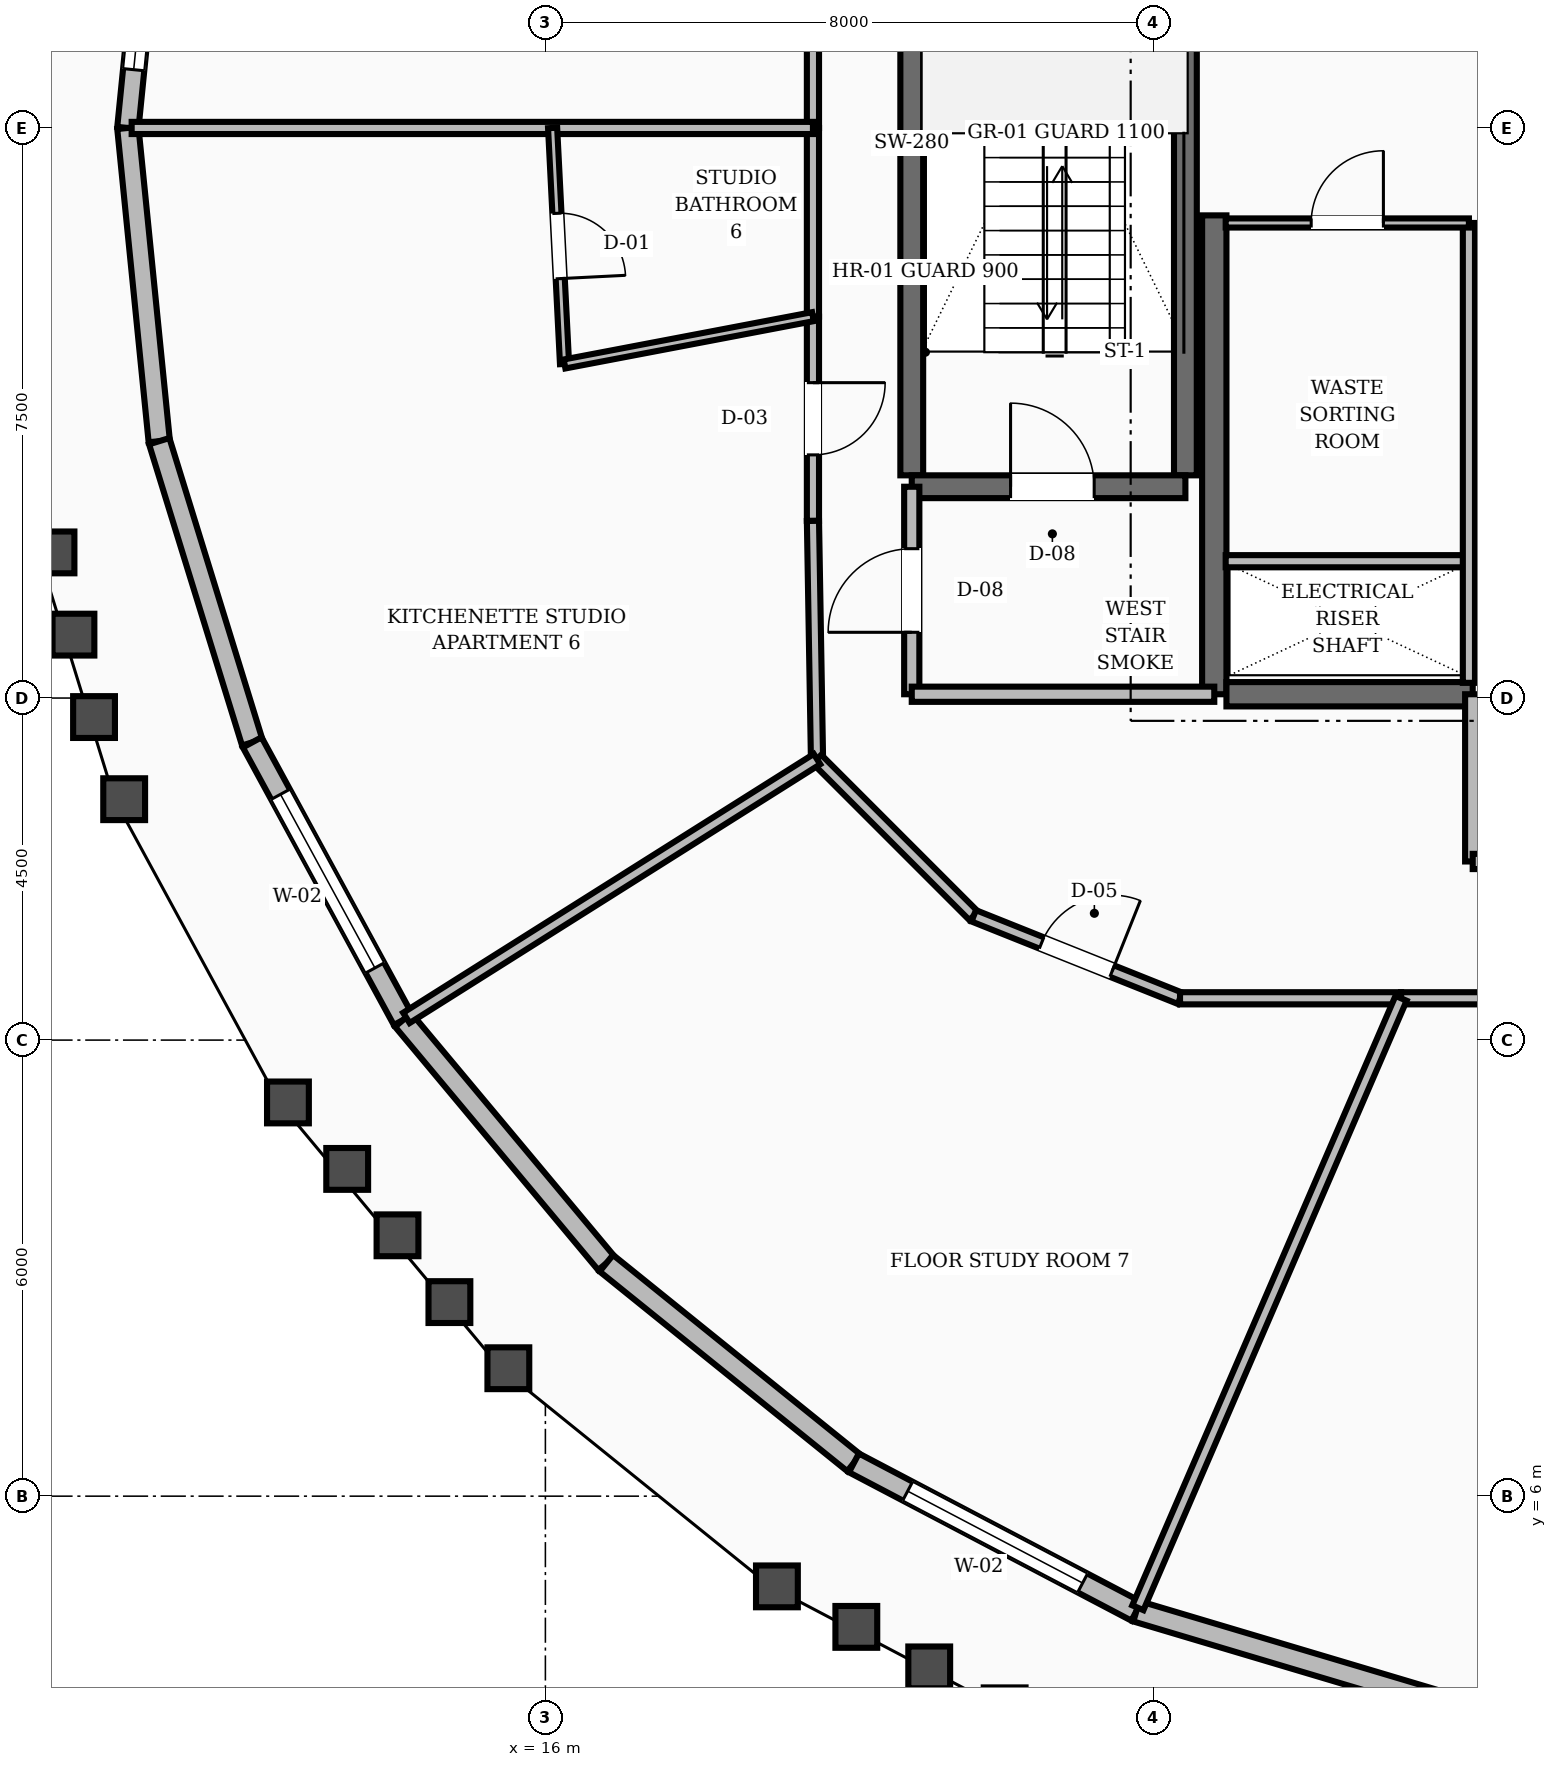
"""IFC4 building model, lengths in metres.
Left out: names, types, materials, properties, quantities, classifications, styles, units other than length and angle.
Written with IfcOpenShell. Run it as: python <this file> out.ifc"""

import sys

from ifc_helpers import new_model, si_unit, direction, frame, frame_2d, origin, place, context, subcontext, project, spatial, rectangle, extrude, element, fill, save


model = new_model("IFC4")
c1 = context("Model", 3, precision=1e-05, world=origin(), true_north=direction((0.0, 1.0)))
c2 = subcontext(c1, "Body", "Model", "MODEL_VIEW")
j1 = project(units=[si_unit("LENGTHUNIT", "METRE"), si_unit("PLANEANGLEUNIT", "RADIAN")], contexts=[c1])
p1 = place(None, origin())
s1 = spatial("IfcSite", under=j1, at=p1, CompositionType="ELEMENT")
p2 = place(p1, origin())
s2 = spatial("IfcBuilding", under=s1, at=p2, CompositionType="ELEMENT")
p3 = place(p2, frame((0.0, 0.0, 243.6)))
s3 = spatial("IfcBuildingStorey", under=s2, at=p3, CompositionType="ELEMENT", Elevation=243.6)
p4 = place(p3, frame((24.8, 16.55, 0.0), z_axis=(0.0, 0.0, 1.0), x_axis=(0.0, 1.0, 0.0)))
e1 = element("IfcWall", 1, at=p4, inside=s3, PredefinedType="SHEAR", context=c2, shape_type="SweptSolid", body=[
    extrude(rectangle(XDim=6.3, YDim=0.32, at=frame_2d((3.15, 0.0))), origin(), (0.0, 0.0, 1.0), 3.6),
])
p5 = place(p3, frame((24.96, 16.55, 0.0), z_axis=(0.0, 0.0, 1.0), x_axis=(1.0, 0.0, 0.0)))
e2 = element("IfcWall", 2, at=p5, inside=s3, PredefinedType="SHEAR", context=c2, shape_type="SweptSolid", body=[
    extrude(rectangle(XDim=3.24, YDim=0.32, at=frame_2d((1.62, 0.0))), origin(), (0.0, 0.0, 1.0), 3.6),
])
for number, where, z_axis, x_axis in (
    (3, (20.82, 19.43, 0.0), (0.0, 0.0, 1.0), (0.0, 1.0, 0.0)),
    (4, (24.42, 19.43, 0.0), (0.0, 0.0, 1.0), (0.0, 1.0, 0.0)),
):
    element("IfcWall", number, at=place(p3, frame(where, z_axis=z_axis, x_axis=x_axis)), inside=s3, PredefinedType="SHEAR", context=c2, shape_type="SweptSolid", body=[
        extrude(rectangle(XDim=8.74, YDim=0.3, at=frame_2d((4.37, 0.0))), origin(), (0.0, 0.0, 1.0), 3.6),
    ])
p6 = place(p3, frame((20.82, 19.28, 0.0), z_axis=(0.0, 0.0, 1.0), x_axis=(1.0, 0.0, 0.0)))
e5 = element("IfcWall", 5, at=p6, inside=s3, PredefinedType="SHEAR", context=c2, shape_type="SweptSolid", body=[
    extrude(rectangle(XDim=3.6, YDim=0.3, at=frame_2d((1.8, 0.0))), origin(), (0.0, 0.0, 1.0), 3.6),
])
p7 = place(p6, frame((1.3, 0.0, 0.0)))
e6 = element("IfcOpeningElement", 6, at=p7, cuts=e5, PredefinedType="OPENING", context=c2, shape_type="SweptSolid", body=[
    extrude(rectangle(XDim=1.1, YDim=2.1, at=frame_2d((0.55, 1.05))), frame((0.0, 0.16, 0.0), z_axis=(0.0, -1.0, 0.0), x_axis=(1.0, 0.0, 0.0)), (0.0, 0.0, 1.0), 0.32),
])
p8 = place(p3, frame((10.92, 28.121, 0.0), z_axis=(0.0, 0.0, 1.0), x_axis=(-0.099748868054, -0.995012644805, 0.0)))
e7 = element("IfcWall", 7, at=p8, inside=s3, PredefinedType="STANDARD", context=c2, shape_type="SweptSolid", body=[
    extrude(rectangle(XDim=4.141, YDim=0.28, at=frame_2d((2.071, 0.0))), origin(), (0.0, 0.0, 1.0), 2.88),
])
p9 = place(p8, frame((0.771, 0.0, 0.8)))
e8 = element("IfcOpeningElement", 8, at=p9, cuts=e7, PredefinedType="OPENING", context=c2, shape_type="SweptSolid", body=[
    extrude(rectangle(XDim=2.6, YDim=1.65, at=frame_2d((1.3, 0.825))), frame((0.0, 0.15, 0.0), z_axis=(0.0, -1.0, 0.0), x_axis=(1.0, 0.0, 0.0)), (0.0, 0.0, 1.0), 0.3),
])
p10 = place(p3, frame((10.507, 24.0, 0.0), z_axis=(0.0, 0.0, 1.0), x_axis=(0.099748868054, -0.995012644805, 0.0)))
e9 = element("IfcWall", 9, at=p10, inside=s3, PredefinedType="STANDARD", context=c2, shape_type="SweptSolid", body=[
    extrude(rectangle(XDim=4.141, YDim=0.28, at=frame_2d((2.071, 0.0))), origin(), (0.0, 0.0, 1.0), 2.88),
])
p11 = place(p3, frame((10.92, 19.879, 0.0), z_axis=(0.0, 0.0, 1.0), x_axis=(0.294900751468, -0.955527889066, 0.0)))
e10 = element("IfcWall", 10, at=p11, inside=s3, PredefinedType="STANDARD", context=c2, shape_type="SweptSolid", body=[
    extrude(rectangle(XDim=4.147, YDim=0.28, at=frame_2d((2.073, 0.0))), origin(), (0.0, 0.0, 1.0), 2.88),
])
p12 = place(p3, frame((12.143, 15.917, 0.0), z_axis=(0.0, 0.0, 1.0), x_axis=(0.477839535555, -0.878447140277, 0.0)))
e11 = element("IfcWall", 11, at=p12, inside=s3, PredefinedType="STANDARD", context=c2, shape_type="SweptSolid", body=[
    extrude(rectangle(XDim=4.157, YDim=0.28, at=frame_2d((2.079, 0.0))), origin(), (0.0, 0.0, 1.0), 2.88),
])
p13 = place(p12, frame((0.778, 0.0, 0.8)))
e12 = element("IfcOpeningElement", 12, at=p13, cuts=e11, PredefinedType="OPENING", context=c2, shape_type="SweptSolid", body=[
    extrude(rectangle(XDim=2.6, YDim=1.65, at=frame_2d((1.3, 0.825))), frame((0.0, 0.15, 0.0), z_axis=(0.0, -1.0, 0.0), x_axis=(1.0, 0.0, 0.0)), (0.0, 0.0, 1.0), 0.3),
])
p14 = place(p3, frame((14.129, 12.265, 0.0), z_axis=(0.0, 0.0, 1.0), x_axis=(0.64097876836, -0.767558609171, 0.0)))
e13 = element("IfcWall", 13, at=p14, inside=s3, PredefinedType="STANDARD", context=c2, shape_type="SweptSolid", body=[
    extrude(rectangle(XDim=4.17, YDim=0.28, at=frame_2d((2.085, 0.0))), origin(), (0.0, 0.0, 1.0), 2.88),
])
p15 = place(p3, frame((16.802, 9.065, 0.0), z_axis=(0.0, 0.0, 1.0), x_axis=(0.778409360575, -0.627757012999, 0.0)))
e14 = element("IfcWall", 14, at=p15, inside=s3, PredefinedType="STANDARD", context=c2, shape_type="SweptSolid", body=[
    extrude(rectangle(XDim=4.184, YDim=0.28, at=frame_2d((2.092, 0.0))), origin(), (0.0, 0.0, 1.0), 2.88),
])
p16 = place(p3, frame((20.059, 6.438, 0.0), z_axis=(0.0, 0.0, 1.0), x_axis=(0.885290153249, -0.46503907853, 0.0)))
e15 = element("IfcWall", 15, at=p16, inside=s3, PredefinedType="STANDARD", context=c2, shape_type="SweptSolid", body=[
    extrude(rectangle(XDim=4.197, YDim=0.28, at=frame_2d((2.099, 0.0))), origin(), (0.0, 0.0, 1.0), 2.88),
])
p17 = place(p16, frame((0.799, 0.0, 0.8)))
e16 = element("IfcOpeningElement", 16, at=p17, cuts=e15, PredefinedType="OPENING", context=c2, shape_type="SweptSolid", body=[
    extrude(rectangle(XDim=2.6, YDim=1.65, at=frame_2d((1.3, 0.825))), frame((0.0, 0.15, 0.0), z_axis=(0.0, -1.0, 0.0), x_axis=(1.0, 0.0, 0.0)), (0.0, 0.0, 1.0), 0.3),
])
p18 = place(p3, frame((23.775, 4.486, 0.0), z_axis=(0.0, 0.0, 1.0), x_axis=(0.958312014412, -0.285723788009, 0.0)))
e17 = element("IfcWall", 17, at=p18, inside=s3, PredefinedType="STANDARD", context=c2, shape_type="SweptSolid", body=[
    extrude(rectangle(XDim=4.207, YDim=0.28, at=frame_2d((2.104, 0.0))), origin(), (0.0, 0.0, 1.0), 2.88),
])
p19 = place(p3, frame((20.82, 16.55, 0.0), z_axis=(0.0, 0.0, 1.0), x_axis=(0.0, 1.0, 0.0)))
e18 = element("IfcWall", 18, at=p19, inside=s3, PredefinedType="SOLIDWALL", context=c2, shape_type="SweptSolid", body=[
    extrude(rectangle(XDim=2.73, YDim=0.2, at=frame_2d((1.365, 0.0))), origin(), (0.0, 0.0, 1.0), 2.87),
])
p20 = place(p19, frame((0.815, 0.0, 0.0)))
e19 = element("IfcOpeningElement", 19, at=p20, cuts=e18, PredefinedType="OPENING", context=c2, shape_type="SweptSolid", body=[
    extrude(rectangle(XDim=1.1, YDim=2.1, at=frame_2d((0.55, 1.05))), frame((0.0, 0.11, 0.0), z_axis=(0.0, -1.0, 0.0), x_axis=(1.0, 0.0, 0.0)), (0.0, 0.0, 1.0), 0.22),
])
p21 = place(p3, frame((20.82, 16.55, 0.0), z_axis=(0.0, 0.0, 1.0), x_axis=(1.0, 0.0, 0.0)))
e20 = element("IfcWall", 20, at=p21, inside=s3, PredefinedType="SOLIDWALL", context=c2, shape_type="SweptSolid", body=[
    extrude(rectangle(XDim=3.98, YDim=0.2, at=frame_2d((1.99, 0.0))), origin(), (0.0, 0.0, 1.0), 2.87),
])
p22 = place(p3, frame((28.2, 14.35, 0.0), z_axis=(0.0, 0.0, 1.0), x_axis=(0.0, 1.0, 0.0)))
e21 = element("IfcWall", 21, at=p22, inside=s3, PredefinedType="SOLIDWALL", context=c2, shape_type="SweptSolid", body=[
    extrude(rectangle(XDim=2.2, YDim=0.2, at=frame_2d((1.1, 0.0))), origin(), (0.0, 0.0, 1.0), 2.87),
])
p23 = place(p3, frame((28.2, 14.35, 0.0), z_axis=(0.0, 0.0, 1.0), x_axis=(1.0, 0.0, 0.0)))
e22 = element("IfcWall", 22, at=p23, inside=s3, PredefinedType="SOLIDWALL", context=c2, shape_type="SweptSolid", body=[
    extrude(rectangle(XDim=7.6, YDim=0.2, at=frame_2d((3.8, 0.0))), origin(), (0.0, 0.0, 1.0), 2.87),
])
p24 = place(p23, frame((3.2, 0.0, 0.0)))
e23 = element("IfcOpeningElement", 23, at=p24, cuts=e22, PredefinedType="OPENING", context=c2, shape_type="SweptSolid", body=[
    extrude(rectangle(XDim=1.2, YDim=2.1, at=frame_2d((0.6, 1.05))), frame((0.0, 0.11, 0.0), z_axis=(0.0, -1.0, 0.0), x_axis=(1.0, 0.0, 0.0)), (0.0, 0.0, 1.0), 0.22),
])
p25 = place(p3, frame((24.95, 18.3, 0.0), z_axis=(0.0, 0.0, 1.0), x_axis=(1.0, 0.0, 0.0)))
e24 = element("IfcWall", 24, at=p25, inside=s3, PredefinedType="SOLIDWALL", context=c2, shape_type="SweptSolid", body=[
    extrude(rectangle(XDim=3.2, YDim=0.16, at=frame_2d((1.6, 0.0))), origin(), (0.0, 0.0, 1.0), 2.87),
])
p26 = place(p3, frame((28.15, 16.7, 0.0), z_axis=(0.0, 0.0, 1.0), x_axis=(0.0, 1.0, 0.0)))
e25 = element("IfcWall", 25, at=p26, inside=s3, PredefinedType="SOLIDWALL", context=c2, shape_type="SweptSolid", body=[
    extrude(rectangle(XDim=6.05, YDim=0.16, at=frame_2d((3.025, 0.0))), origin(), (0.0, 0.0, 1.0), 2.87),
])
p27 = place(p3, frame((24.95, 22.75, 0.0), z_axis=(0.0, 0.0, 1.0), x_axis=(1.0, 0.0, 0.0)))
e26 = element("IfcWall", 26, at=p27, inside=s3, PredefinedType="PARTITIONING", context=c2, shape_type="SweptSolid", body=[
    extrude(rectangle(XDim=3.2, YDim=0.12, at=frame_2d((1.6, 0.0))), origin(), (0.0, 0.0, 1.0), 2.87),
])
p28 = place(p27, frame((1.125, 0.0, 0.0)))
e27 = element("IfcOpeningElement", 27, at=p28, cuts=e26, PredefinedType="OPENING", context=c2, shape_type="SweptSolid", body=[
    extrude(rectangle(XDim=0.95, YDim=2.1, at=frame_2d((0.475, 1.05))), frame((0.0, 0.07, 0.0), z_axis=(0.0, -1.0, 0.0), x_axis=(1.0, 0.0, 0.0)), (0.0, 0.0, 1.0), 0.14),
])
for number, where, z_axis, x_axis in (
    (28, (19.52, 26.482, 0.0), (0.0, 0.0, 1.0), (0.0, -1.0, 0.0)),
    (29, (19.52, 24.0, 0.0), (0.0, 0.0, 1.0), (0.0, -1.0, 0.0)),
):
    element("IfcWall", number, at=place(p3, frame(where, z_axis=z_axis, x_axis=x_axis)), inside=s3, PredefinedType="SOLIDWALL", context=c2, shape_type="SweptSolid", body=[
        extrude(rectangle(XDim=2.482, YDim=0.16, at=frame_2d((1.241, 0.0))), origin(), (0.0, 0.0, 1.0), 2.87),
    ])
p29 = place(p3, frame((19.52, 21.518, 0.0), z_axis=(0.0, 0.0, 1.0), x_axis=(0.0, -1.0, 0.0)))
e30 = element("IfcWall", 30, at=p29, inside=s3, PredefinedType="SOLIDWALL", context=c2, shape_type="SweptSolid", body=[
    extrude(rectangle(XDim=2.687, YDim=0.16, at=frame_2d((1.344, 0.0))), origin(), (0.0, 0.0, 1.0), 2.87),
])
p30 = place(p29, frame((0.868, 0.0, 0.0)))
e31 = element("IfcOpeningElement", 31, at=p30, cuts=e30, PredefinedType="OPENING", context=c2, shape_type="SweptSolid", body=[
    extrude(rectangle(XDim=0.95, YDim=2.1, at=frame_2d((0.475, 1.05))), frame((0.0, 0.09, 0.0), z_axis=(0.0, -1.0, 0.0), x_axis=(1.0, 0.0, 0.0)), (0.0, 0.0, 1.0), 0.18),
])
p31 = place(p3, frame((19.52, 18.831, 0.0), z_axis=(0.0, 0.0, 1.0), x_axis=(0.016981035134, -0.999855811828, 0.0)))
e32 = element("IfcWall", 32, at=p31, inside=s3, PredefinedType="SOLIDWALL", context=c2, shape_type="SweptSolid", body=[
    extrude(rectangle(XDim=3.134, YDim=0.16, at=frame_2d((1.567, 0.0))), origin(), (0.0, 0.0, 1.0), 2.87),
])
p32 = place(p3, frame((19.573, 15.697, 0.0), z_axis=(0.0, 0.0, 1.0), x_axis=(0.707106781187, -0.707106781187, 0.0)))
e33 = element("IfcWall", 33, at=p32, inside=s3, PredefinedType="SOLIDWALL", context=c2, shape_type="SweptSolid", body=[
    extrude(rectangle(XDim=2.916, YDim=0.16, at=frame_2d((1.458, 0.0))), origin(), (0.0, 0.0, 1.0), 2.87),
])
p33 = place(p3, frame((21.635, 13.635, 0.0), z_axis=(0.0, 0.0, 1.0), x_axis=(0.92856882165, -0.371160266542, 0.0)))
e34 = element("IfcWall", 34, at=p33, inside=s3, PredefinedType="SOLIDWALL", context=c2, shape_type="SweptSolid", body=[
    extrude(rectangle(XDim=2.923, YDim=0.16, at=frame_2d((1.461, 0.0))), origin(), (0.0, 0.0, 1.0), 2.87),
])
p34 = place(p33, frame((0.962, 0.0, 0.0)))
e35 = element("IfcOpeningElement", 35, at=p34, cuts=e34, PredefinedType="OPENING", context=c2, shape_type="SweptSolid", body=[
    extrude(rectangle(XDim=1.0, YDim=2.1, at=frame_2d((0.5, 1.05))), frame((0.0, 0.09, 0.0), z_axis=(0.0, -1.0, 0.0), x_axis=(1.0, 0.0, 0.0)), (0.0, 0.0, 1.0), 0.18),
])
p35 = place(p3, frame((24.349, 12.55, 0.0), z_axis=(0.0, 0.0, 1.0), x_axis=(1.0, 0.0, 0.0)))
e36 = element("IfcWall", 36, at=p35, inside=s3, PredefinedType="SOLIDWALL", context=c2, shape_type="SweptSolid", body=[
    extrude(rectangle(XDim=2.908, YDim=0.16, at=frame_2d((1.454, 0.0))), origin(), (0.0, 0.0, 1.0), 2.87),
])
p36 = place(p3, frame((27.257, 12.55, 0.0), z_axis=(0.0, 0.0, 1.0), x_axis=(1.0, 0.0, 0.0)))
e37 = element("IfcWall", 37, at=p36, inside=s3, PredefinedType="SOLIDWALL", context=c2, shape_type="SweptSolid", body=[
    extrude(rectangle(XDim=2.465, YDim=0.16, at=frame_2d((1.232, 0.0))), origin(), (0.0, 0.0, 1.0), 2.87),
])
p37 = place(p3, frame((19.52, 24.0, 0.0), z_axis=(0.0, 0.0, 1.0), x_axis=(-1.0, 0.0, 0.0)))
e38 = element("IfcWall", 38, at=p37, inside=s3, PredefinedType="SOLIDWALL", context=c2, shape_type="SweptSolid", body=[
    extrude(rectangle(XDim=8.963, YDim=0.16, at=frame_2d((4.481, 0.0))), origin(), (0.0, 0.0, 1.0), 2.87),
])
p38 = place(p3, frame((16.095, 24.0, 0.0), z_axis=(0.0, 0.0, 1.0), x_axis=(0.050493770541, -0.99872437596, 0.0)))
e39 = element("IfcWall", 39, at=p38, inside=s3, PredefinedType="PARTITIONING", context=c2, shape_type="SweptSolid", body=[
    extrude(rectangle(XDim=3.109, YDim=0.12, at=frame_2d((1.554, 0.0))), origin(), (0.0, 0.0, 1.0), 2.87),
])
p39 = place(p38, frame((1.125, 0.0, 0.0)))
e40 = element("IfcOpeningElement", 40, at=p39, cuts=e39, PredefinedType="OPENING", context=c2, shape_type="SweptSolid", body=[
    extrude(rectangle(XDim=0.86, YDim=2.1, at=frame_2d((0.43, 1.05))), frame((0.0, 0.07, 0.0), z_axis=(0.0, -1.0, 0.0), x_axis=(1.0, 0.0, 0.0)), (0.0, 0.0, 1.0), 0.14),
])
p40 = place(p3, frame((19.52, 21.518, 0.0), z_axis=(0.0, 0.0, 1.0), x_axis=(-0.982334712285, -0.187132340978, 0.0)))
e41 = element("IfcWall", 41, at=p40, inside=s3, PredefinedType="PARTITIONING", context=c2, shape_type="SweptSolid", body=[
    extrude(rectangle(XDim=3.327, YDim=0.12, at=frame_2d((1.664, 0.0))), origin(), (0.0, 0.0, 1.0), 2.87),
])
p41 = place(p3, frame((19.573, 15.697, 0.0), z_axis=(0.0, 0.0, 1.0), x_axis=(-0.845977345185, -0.533218840096, 0.0)))
e42 = element("IfcWall", 42, at=p41, inside=s3, PredefinedType="SOLIDWALL", context=c2, shape_type="SweptSolid", body=[
    extrude(rectangle(XDim=6.385, YDim=0.16, at=frame_2d((3.193, 0.0))), origin(), (0.0, 0.0, 1.0), 2.87),
])
p42 = place(p3, frame((27.257, 12.55, 0.0), z_axis=(0.0, 0.0, 1.0), x_axis=(-0.396464931031, -0.918049867089, 0.0)))
e43 = element("IfcWall", 43, at=p42, inside=s3, PredefinedType="SOLIDWALL", context=c2, shape_type="SweptSolid", body=[
    extrude(rectangle(XDim=8.734, YDim=0.16, at=frame_2d((4.367, 0.0))), origin(), (0.0, 0.0, 1.0), 2.87),
])
p43 = place(p9, origin())
e44 = element("IfcWindow", 44, at=p43, inside=s3, PartitioningType="SINGLE_PANEL", PredefinedType="WINDOW", context=c2, shape_type="SweptSolid", body=[
    extrude(rectangle(XDim=2.6, YDim=1.65, at=frame_2d((1.3, 0.825))), frame((0.0, 0.03, 0.0), z_axis=(0.0, -1.0, 0.0), x_axis=(1.0, 0.0, 0.0)), (0.0, 0.0, 1.0), 0.06),
])
fill(e8, e44)
p44 = place(p13, origin())
e45 = element("IfcWindow", 45, at=p44, inside=s3, PartitioningType="SINGLE_PANEL", PredefinedType="WINDOW", context=c2, shape_type="SweptSolid", body=[
    extrude(rectangle(XDim=2.6, YDim=1.65, at=frame_2d((1.3, 0.825))), frame((0.0, 0.03, 0.0), z_axis=(0.0, -1.0, 0.0), x_axis=(1.0, 0.0, 0.0)), (0.0, 0.0, 1.0), 0.06),
])
fill(e12, e45)
p45 = place(p17, origin())
e46 = element("IfcWindow", 46, at=p45, inside=s3, PartitioningType="SINGLE_PANEL", PredefinedType="WINDOW", context=c2, shape_type="SweptSolid", body=[
    extrude(rectangle(XDim=2.6, YDim=1.65, at=frame_2d((1.3, 0.825))), frame((0.0, 0.03, 0.0), z_axis=(0.0, -1.0, 0.0), x_axis=(1.0, 0.0, 0.0)), (0.0, 0.0, 1.0), 0.06),
])
fill(e16, e46)
p46 = place(p7, origin())
e47 = element("IfcDoor", 47, at=p46, inside=s3, OperationType="SINGLE_SWING_LEFT", PredefinedType="DOOR", context=c2, shape_type="SweptSolid", body=[
    extrude(rectangle(XDim=1.1, YDim=2.1, at=frame_2d((0.55, 1.05))), frame((0.0, 0.025, 0.0), z_axis=(0.0, -1.0, 0.0), x_axis=(1.0, 0.0, 0.0)), (0.0, 0.0, 1.0), 0.05),
])
fill(e6, e47)
p47 = place(p20, origin())
e48 = element("IfcDoor", 48, at=p47, inside=s3, OperationType="SINGLE_SWING_LEFT", PredefinedType="DOOR", context=c2, shape_type="SweptSolid", body=[
    extrude(rectangle(XDim=1.1, YDim=2.1, at=frame_2d((0.55, 1.05))), frame((0.0, 0.025, 0.0), z_axis=(0.0, -1.0, 0.0), x_axis=(1.0, 0.0, 0.0)), (0.0, 0.0, 1.0), 0.05),
])
fill(e19, e48)
p48 = place(p28, origin())
e49 = element("IfcDoor", 49, at=p48, inside=s3, OperationType="SINGLE_SWING_RIGHT", PredefinedType="DOOR", context=c2, shape_type="SweptSolid", body=[
    extrude(rectangle(XDim=0.95, YDim=2.1, at=frame_2d((0.475, 1.05))), frame((0.0, 0.025, 0.0), z_axis=(0.0, -1.0, 0.0), x_axis=(1.0, 0.0, 0.0)), (0.0, 0.0, 1.0), 0.05),
])
fill(e27, e49)
p49 = place(p39, origin())
e50 = element("IfcDoor", 50, at=p49, inside=s3, OperationType="SINGLE_SWING_RIGHT", PredefinedType="DOOR", context=c2, shape_type="SweptSolid", body=[
    extrude(rectangle(XDim=0.86, YDim=2.1, at=frame_2d((0.43, 1.05))), frame((0.0, 0.025, 0.0), z_axis=(0.0, -1.0, 0.0), x_axis=(1.0, 0.0, 0.0)), (0.0, 0.0, 1.0), 0.05),
])
fill(e40, e50)
p50 = place(p30, origin())
e51 = element("IfcDoor", 51, at=p50, inside=s3, OperationType="SINGLE_SWING_LEFT", PredefinedType="DOOR", context=c2, shape_type="SweptSolid", body=[
    extrude(rectangle(XDim=0.95, YDim=2.1, at=frame_2d((0.475, 1.05))), frame((0.0, 0.025, 0.0), z_axis=(0.0, -1.0, 0.0), x_axis=(1.0, 0.0, 0.0)), (0.0, 0.0, 1.0), 0.05),
])
fill(e31, e51)
p51 = place(p34, origin())
e52 = element("IfcDoor", 52, at=p51, inside=s3, OperationType="SINGLE_SWING_RIGHT", PredefinedType="DOOR", context=c2, shape_type="SweptSolid", body=[
    extrude(rectangle(XDim=1.0, YDim=2.1, at=frame_2d((0.5, 1.05))), frame((0.0, 0.025, 0.0), z_axis=(0.0, -1.0, 0.0), x_axis=(1.0, 0.0, 0.0)), (0.0, 0.0, 1.0), 0.05),
])
fill(e35, e52)
save(model, sys.argv[1])
